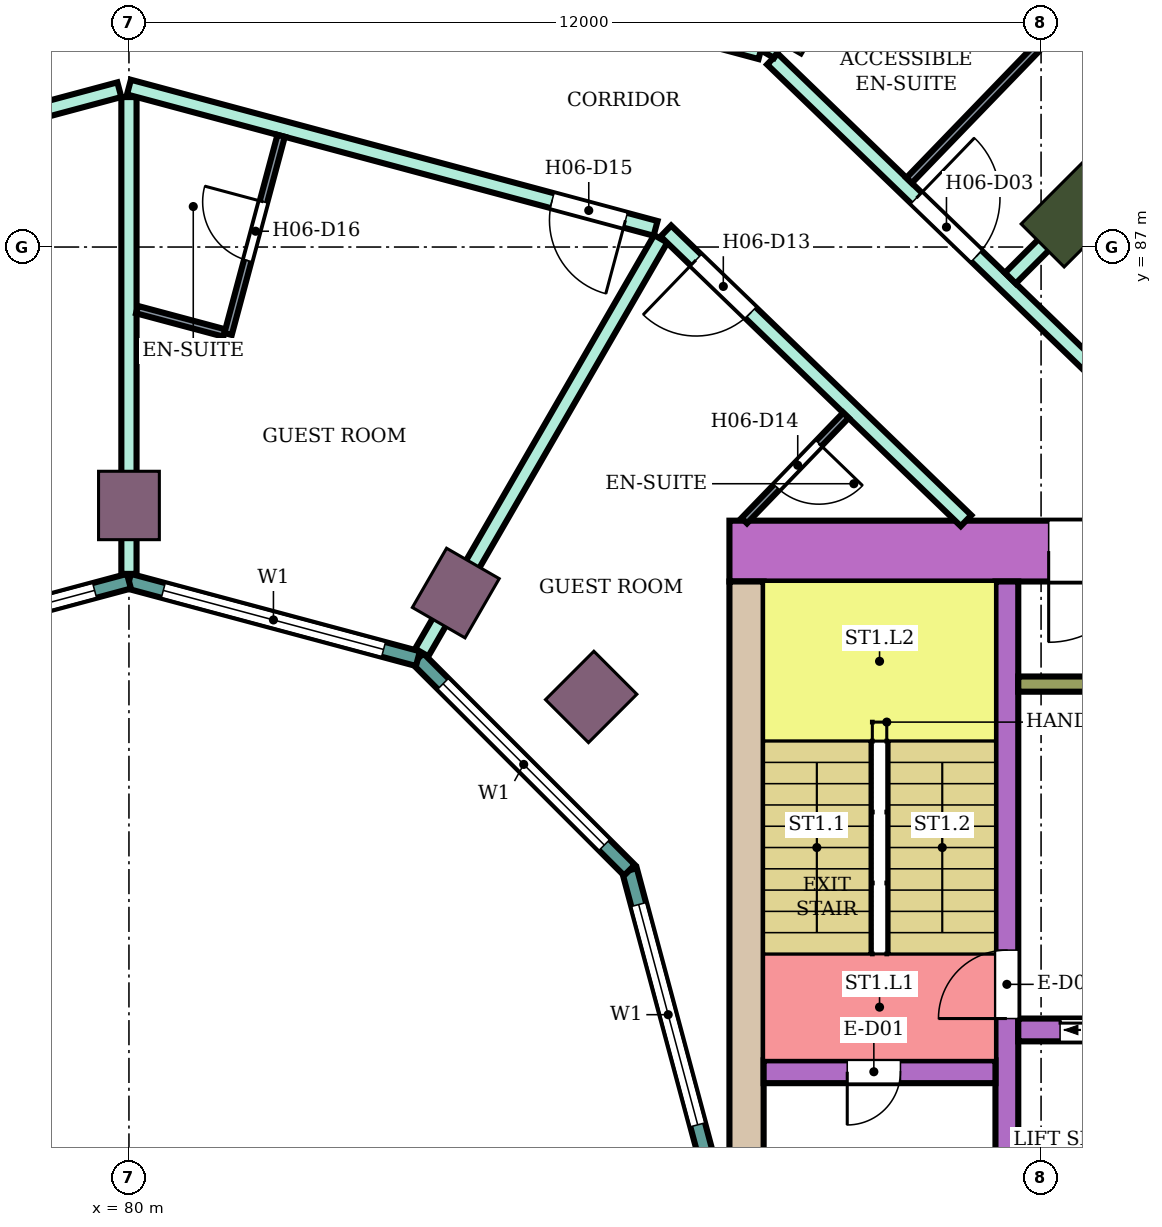
"""IFC4 building model, lengths in metres.
Left out: names, types, materials, properties, quantities, classifications, styles, units other than length and angle.
Written with IfcOpenShell. Run it as: python <this file> out.ifc"""

import sys

from ifc_helpers import new_model, si_unit, direction, frame, frame_2d, origin, origin_2d, place, context, subcontext, project, spatial, rectangle, extrude, element, fill, save


model = new_model("IFC4")
c1 = context("Model", 3, precision=1e-05, world=origin(), true_north=direction((0.0, 1.0)))
c2 = subcontext(c1, "Body", "Model", "MODEL_VIEW")
j1 = project(units=[si_unit("LENGTHUNIT", "METRE"), si_unit("PLANEANGLEUNIT", "RADIAN")], contexts=[c1])
p1 = place(None, origin())
s1 = spatial("IfcSite", under=j1, at=p1, CompositionType="ELEMENT")
p2 = place(p1, origin())
s2 = spatial("IfcBuilding", under=s1, at=p2, CompositionType="ELEMENT")
p3 = place(p2, frame((0.0, 0.0, 101.4)))
s3 = spatial("IfcBuildingStorey", under=s2, at=p3, CompositionType="ELEMENT", Elevation=101.4)
for number, where, z_axis, x_axis in (
    (1, (92.445, 87.445, 0.0), (0.0, 0.0, 1.0), (0.707, 0.707, 0.0)),
    (2, (88.8, 90.242, 0.0), (0.0, 0.0, 1.0), (0.5, 0.866, 0.0)),
):
    element("IfcColumn", number, at=place(p3, frame(where, z_axis=z_axis, x_axis=x_axis)), inside=s3, PredefinedType="COLUMN", context=c2, shape_type="SweptSolid", body=[
        extrude(rectangle(XDim=1.2, YDim=0.8, at=origin_2d()), origin(), (0.0, 0.0, 1.0), 3.8),
    ])
for number, where, z_axis, x_axis in (
    (3, (86.081, 81.081, 0.0), (0.0, 0.0, 1.0), (0.707, 0.707, 0.0)),
    (4, (84.3, 82.448, 0.0), (0.0, 0.0, 1.0), (0.5, 0.866, 0.0)),
    (5, (80.0, 83.6, 0.0), (0.0, 0.0, 1.0), (0.0, 1.0, 0.0)),
):
    element("IfcColumn", number, at=place(p3, frame(where, z_axis=z_axis, x_axis=x_axis)), inside=s3, PredefinedType="COLUMN", context=c2, shape_type="SweptSolid", body=[
        extrude(rectangle(XDim=0.9, YDim=0.8, at=origin_2d()), origin(), (0.0, 0.0, 1.0), 3.8),
    ])
p4 = place(p3, frame((87.9, 83.0, 0.0), z_axis=(0.0, 0.0, 1.0), x_axis=(1.0, 0.0, 0.0)))
e6 = element("IfcWall", 6, at=p4, inside=s3, PredefinedType="SHEAR", context=c2, shape_type="SweptSolid", body=[
    extrude(rectangle(XDim=14.7, YDim=0.8, at=frame_2d((7.35, 0.0))), origin(), (0.0, 0.0, 1.0), 3.48),
])
p5 = place(p4, frame((4.2, 0.0, 0.0)))
e7 = element("IfcOpeningElement", 7, at=p5, cuts=e6, PredefinedType="OPENING", context=c2, shape_type="SweptSolid", body=[
    extrude(rectangle(XDim=2.4, YDim=2.4, at=frame_2d((1.2, 1.2))), frame((0.0, 0.41, 0.0), z_axis=(0.0, -1.0, 0.0), x_axis=(1.0, 0.0, 0.0)), (0.0, 0.0, 1.0), 0.82),
])
p6 = place(p3, frame((88.125, 75.0, 0.0), z_axis=(0.0, 0.0, 1.0), x_axis=(0.0, 1.0, 0.0)))
e8 = element("IfcWall", 8, at=p6, inside=s3, PredefinedType="SHEAR", context=c2, shape_type="SweptSolid", body=[
    extrude(rectangle(XDim=7.6, YDim=0.45, at=frame_2d((3.8, 0.0))), origin(), (0.0, 0.0, 1.0), 3.48),
])
p7 = place(p3, frame((91.55, 75.0, 0.0), z_axis=(0.0, 0.0, 1.0), x_axis=(0.0, 1.0, 0.0)))
e9 = element("IfcWall", 9, at=p7, inside=s3, PredefinedType="SHEAR", context=c2, shape_type="SweptSolid", body=[
    extrude(rectangle(XDim=7.6, YDim=0.3, at=frame_2d((3.8, 0.0))), origin(), (0.0, 0.0, 1.0), 3.48),
])
p8 = place(p7, frame((1.85, 0.0, 0.0)))
e10 = element("IfcOpeningElement", 10, at=p8, cuts=e9, PredefinedType="OPENING", context=c2, shape_type="SweptSolid", body=[
    extrude(rectangle(XDim=0.9, YDim=2.1, at=frame_2d((0.45, 1.05))), frame((0.0, 0.16, 0.0), z_axis=(0.0, -1.0, 0.0), x_axis=(1.0, 0.0, 0.0)), (0.0, 0.0, 1.0), 0.32),
])
p9 = place(p3, frame((88.35, 76.15, 0.0), z_axis=(0.0, 0.0, 1.0), x_axis=(1.0, 0.0, 0.0)))
e11 = element("IfcWall", 11, at=p9, inside=s3, PredefinedType="SHEAR", context=c2, shape_type="SweptSolid", body=[
    extrude(rectangle(XDim=3.05, YDim=0.3, at=frame_2d((1.525, 0.0))), origin(), (0.0, 0.0, 1.0), 3.48),
])
p10 = place(p9, frame((1.1, 0.0, 0.0)))
e12 = element("IfcOpeningElement", 12, at=p10, cuts=e11, PredefinedType="OPENING", context=c2, shape_type="SweptSolid", body=[
    extrude(rectangle(XDim=0.7, YDim=2.0, at=frame_2d((0.35, 1.0))), frame((0.0, 0.16, 0.0), z_axis=(0.0, -1.0, 0.0), x_axis=(1.0, 0.0, 0.0)), (0.0, 0.0, 1.0), 0.32),
])
p11 = place(p3, frame((91.7, 76.7, 0.0), z_axis=(0.0, 0.0, 1.0), x_axis=(1.0, 0.0, 0.0)))
e13 = element("IfcWall", 13, at=p11, inside=s3, PredefinedType="SHEAR", context=c2, shape_type="SweptSolid", body=[
    extrude(rectangle(XDim=10.9, YDim=0.3, at=frame_2d((5.45, 0.0))), origin(), (0.0, 0.0, 1.0), 3.48),
])
p12 = place(p11, frame((0.55, 0.0, 0.0)))
e14 = element("IfcOpeningElement", 14, at=p12, cuts=e13, PredefinedType="OPENING", context=c2, shape_type="SweptSolid", body=[
    extrude(rectangle(XDim=1.1, YDim=2.1, at=frame_2d((0.55, 1.05))), frame((0.0, 0.16, 0.0), z_axis=(0.0, -1.0, 0.0), x_axis=(1.0, 0.0, 0.0)), (0.0, 0.0, 1.0), 0.32),
])
p13 = place(p11, frame((8.1, 0.0, 0.0)))
e15 = element("IfcOpeningElement", 15, at=p13, cuts=e13, PredefinedType="OPENING", context=c2, shape_type="SweptSolid", body=[
    extrude(rectangle(XDim=1.0, YDim=2.1, at=frame_2d((0.5, 1.05))), frame((0.0, 0.16, 0.0), z_axis=(0.0, -1.0, 0.0), x_axis=(1.0, 0.0, 0.0)), (0.0, 0.0, 1.0), 0.32),
])
p14 = place(p3, frame((91.7, 81.25, 0.0), z_axis=(0.0, 0.0, 1.0), x_axis=(1.0, 0.0, 0.0)))
e16 = element("IfcWall", 16, at=p14, inside=s3, PredefinedType="SHEAR", context=c2, shape_type="SweptSolid", body=[
    extrude(rectangle(XDim=4.65, YDim=0.2, at=frame_2d((2.325, 0.0))), origin(), (0.0, 0.0, 1.0), 3.48),
])
p15 = place(p3, frame((87.604, 75.0, 0.0), z_axis=(0.0, 0.0, 1.0), x_axis=(-0.258789828301, 0.965933654434, 0.0)))
e17 = element("IfcWall", 17, at=p15, inside=s3, PredefinedType="NOTDEFINED", context=c2, shape_type="SweptSolid", body=[
    extrude(rectangle(XDim=3.936, YDim=0.2, at=frame_2d((1.968, 0.0))), origin(), (0.0, 0.0, 1.0), 3.8),
])
p16 = place(p15, frame((0.468, 0.0, 0.9)))
e18 = element("IfcOpeningElement", 18, at=p16, cuts=e17, PredefinedType="OPENING", context=c2, shape_type="SweptSolid", body=[
    extrude(rectangle(XDim=3.0, YDim=2.3, at=frame_2d((1.5, 1.15))), frame((0.0, 0.11, 0.0), z_axis=(0.0, -1.0, 0.0), x_axis=(1.0, 0.0, 0.0)), (0.0, 0.0, 1.0), 0.22),
])
p17 = place(p3, frame((86.585, 78.802, 0.0), z_axis=(0.0, 0.0, 1.0), x_axis=(-0.707106781187, 0.707106781187, 0.0)))
e19 = element("IfcWall", 19, at=p17, inside=s3, PredefinedType="NOTDEFINED", context=c2, shape_type="SweptSolid", body=[
    extrude(rectangle(XDim=3.936, YDim=0.2, at=frame_2d((1.968, 0.0))), origin(), (0.0, 0.0, 1.0), 3.8),
])
p18 = place(p17, frame((0.468, 0.0, 0.9)))
e20 = element("IfcOpeningElement", 20, at=p18, cuts=e19, PredefinedType="OPENING", context=c2, shape_type="SweptSolid", body=[
    extrude(rectangle(XDim=3.0, YDim=2.3, at=frame_2d((1.5, 1.15))), frame((0.0, 0.11, 0.0), z_axis=(0.0, -1.0, 0.0), x_axis=(1.0, 0.0, 0.0)), (0.0, 0.0, 1.0), 0.22),
])
p19 = place(p3, frame((83.802, 81.585, 0.0), z_axis=(0.0, 0.0, 1.0), x_axis=(-0.965933654434, 0.258789828301, 0.0)))
e21 = element("IfcWall", 21, at=p19, inside=s3, PredefinedType="NOTDEFINED", context=c2, shape_type="SweptSolid", body=[
    extrude(rectangle(XDim=3.936, YDim=0.2, at=frame_2d((1.968, 0.0))), origin(), (0.0, 0.0, 1.0), 3.8),
])
p20 = place(p19, frame((0.468, 0.0, 0.9)))
e22 = element("IfcOpeningElement", 22, at=p20, cuts=e21, PredefinedType="OPENING", context=c2, shape_type="SweptSolid", body=[
    extrude(rectangle(XDim=3.0, YDim=2.3, at=frame_2d((1.5, 1.15))), frame((0.0, 0.11, 0.0), z_axis=(0.0, -1.0, 0.0), x_axis=(1.0, 0.0, 0.0)), (0.0, 0.0, 1.0), 0.22),
])
p21 = place(p3, frame((80.0, 82.604, 0.0), z_axis=(0.0, 0.0, 1.0), x_axis=(-0.965933654434, -0.258789828301, 0.0)))
e23 = element("IfcWall", 23, at=p21, inside=s3, PredefinedType="NOTDEFINED", context=c2, shape_type="SweptSolid", body=[
    extrude(rectangle(XDim=3.936, YDim=0.2, at=frame_2d((1.968, 0.0))), origin(), (0.0, 0.0, 1.0), 3.8),
])
p22 = place(p21, frame((0.468, 0.0, 0.9)))
e24 = element("IfcOpeningElement", 24, at=p22, cuts=e23, PredefinedType="OPENING", context=c2, shape_type="SweptSolid", body=[
    extrude(rectangle(XDim=3.0, YDim=2.3, at=frame_2d((1.5, 1.15))), frame((0.0, 0.11, 0.0), z_axis=(0.0, -1.0, 0.0), x_axis=(1.0, 0.0, 0.0)), (0.0, 0.0, 1.0), 0.22),
])
p23 = place(p3, frame((71.614, 89.55, 0.0), z_axis=(0.0, 0.0, 1.0), x_axis=(0.965982378603, 0.258607896685, 0.0)))
e25 = element("IfcWall", 25, at=p23, inside=s3, PredefinedType="PARTITIONING", context=c2, shape_type="SweptSolid", body=[
    extrude(rectangle(XDim=8.632, YDim=0.2, at=frame_2d((4.316, 0.0))), origin(), (0.0, 0.0, 1.0), 3.35),
])
p24 = place(p23, frame((2.804, 0.0, 0.0)))
e26 = element("IfcOpeningElement", 26, at=p24, cuts=e25, PredefinedType="OPENING", context=c2, shape_type="SweptSolid", body=[
    extrude(rectangle(XDim=1.0, YDim=2.1, at=frame_2d((0.5, 1.05))), frame((0.0, 0.11, 0.0), z_axis=(0.0, -1.0, 0.0), x_axis=(1.0, 0.0, 0.0)), (0.0, 0.0, 1.0), 0.22),
])
p25 = place(p3, frame((72.936, 87.211, 0.0), z_axis=(0.0, 0.0, 1.0), x_axis=(0.965917703859, 0.258849356521, 0.0)))
e27 = element("IfcWall", 27, at=p25, inside=s3, PredefinedType="PARTITIONING", context=c2, shape_type="SweptSolid", body=[
    extrude(rectangle(XDim=7.182, YDim=0.2, at=frame_2d((3.591, 0.0))), origin(), (0.0, 0.0, 1.0), 3.35),
])
p26 = place(p25, frame((2.757, 0.0, 0.0)))
e28 = element("IfcOpeningElement", 28, at=p26, cuts=e27, PredefinedType="OPENING", context=c2, shape_type="SweptSolid", body=[
    extrude(rectangle(XDim=1.8, YDim=2.1, at=frame_2d((0.9, 1.05))), frame((0.0, 0.11, 0.0), z_axis=(0.0, -1.0, 0.0), x_axis=(1.0, 0.0, 0.0)), (0.0, 0.0, 1.0), 0.22),
])
p27 = place(p3, frame((80.0, 82.7, 0.0), z_axis=(0.0, 0.0, 1.0), x_axis=(0.0, 1.0, 0.0)))
e29 = element("IfcWall", 29, at=p27, inside=s3, PredefinedType="PARTITIONING", context=c2, shape_type="SweptSolid", body=[
    extrude(rectangle(XDim=6.273, YDim=0.2, at=frame_2d((3.136, 0.0))), origin(), (0.0, 0.0, 1.0), 3.35),
])
p28 = place(p3, frame((80.0, 89.104, 0.0), z_axis=(0.0, 0.0, 1.0), x_axis=(0.965856548257, -0.259077455964, 0.0)))
e30 = element("IfcWall", 30, at=p28, inside=s3, PredefinedType="PARTITIONING", context=c2, shape_type="SweptSolid", body=[
    extrude(rectangle(XDim=7.173, YDim=0.2, at=frame_2d((3.586, 0.0))), origin(), (0.0, 0.0, 1.0), 3.35),
])
p29 = place(p28, frame((5.763, 0.0, 0.0)))
e31 = element("IfcOpeningElement", 31, at=p29, cuts=e30, PredefinedType="OPENING", context=c2, shape_type="SweptSolid", body=[
    extrude(rectangle(XDim=1.0, YDim=2.1, at=frame_2d((0.5, 1.05))), frame((0.0, 0.11, 0.0), z_axis=(0.0, -1.0, 0.0), x_axis=(1.0, 0.0, 0.0)), (0.0, 0.0, 1.0), 0.22),
])
p30 = place(p3, frame((80.0, 91.796, 0.0), z_axis=(0.0, 0.0, 1.0), x_axis=(0.965917643923, -0.258849580177, 0.0)))
e32 = element("IfcWall", 32, at=p30, inside=s3, PredefinedType="PARTITIONING", context=c2, shape_type="SweptSolid", body=[
    extrude(rectangle(XDim=8.602, YDim=0.2, at=frame_2d((4.301, 0.0))), origin(), (0.0, 0.0, 1.0), 3.35),
])
p31 = place(p30, frame((2.091, 0.0, 0.0)))
e33 = element("IfcOpeningElement", 33, at=p31, cuts=e32, PredefinedType="OPENING", context=c2, shape_type="SweptSolid", body=[
    extrude(rectangle(XDim=1.8, YDim=2.1, at=frame_2d((0.9, 1.05))), frame((0.0, 0.11, 0.0), z_axis=(0.0, -1.0, 0.0), x_axis=(1.0, 0.0, 0.0)), (0.0, 0.0, 1.0), 0.22),
])
p32 = place(p3, frame((83.852, 81.665, 0.0), z_axis=(0.0, 0.0, 1.0), x_axis=(0.500236829077, 0.86588862727, 0.0)))
e34 = element("IfcWall", 34, at=p32, inside=s3, PredefinedType="PARTITIONING", context=c2, shape_type="SweptSolid", body=[
    extrude(rectangle(XDim=6.286, YDim=0.2, at=frame_2d((3.143, 0.0))), origin(), (0.0, 0.0, 1.0), 3.35),
])
p33 = place(p3, frame((87.064, 87.211, 0.0), z_axis=(0.0, 0.0, 1.0), x_axis=(0.719540958932, -0.694450004262, 0.0)))
e35 = element("IfcWall", 35, at=p33, inside=s3, PredefinedType="PARTITIONING", context=c2, shape_type="SweptSolid", body=[
    extrude(rectangle(XDim=5.488, YDim=0.2, at=frame_2d((2.744, 0.0))), origin(), (0.0, 0.0, 1.0), 3.35),
])
p34 = place(p33, frame((0.55, 0.0, 0.0)))
e36 = element("IfcOpeningElement", 36, at=p34, cuts=e35, PredefinedType="OPENING", context=c2, shape_type="SweptSolid", body=[
    extrude(rectangle(XDim=1.0, YDim=2.1, at=frame_2d((0.5, 1.05))), frame((0.0, 0.11, 0.0), z_axis=(0.0, -1.0, 0.0), x_axis=(1.0, 0.0, 0.0)), (0.0, 0.0, 1.0), 0.22),
])
p35 = place(p3, frame((88.465, 89.473, 0.0), z_axis=(0.0, 0.0, 1.0), x_axis=(0.719474304909, -0.694519059908, 0.0)))
e37 = element("IfcWall", 37, at=p35, inside=s3, PredefinedType="PARTITIONING", context=c2, shape_type="SweptSolid", body=[
    extrude(rectangle(XDim=6.525, YDim=0.2, at=frame_2d((3.263, 0.0))), origin(), (0.0, 0.0, 1.0), 3.35),
])
p36 = place(p35, frame((2.633, 0.0, 0.0)))
e38 = element("IfcOpeningElement", 38, at=p36, cuts=e37, PredefinedType="OPENING", context=c2, shape_type="SweptSolid", body=[
    extrude(rectangle(XDim=1.1, YDim=2.1, at=frame_2d((0.55, 1.05))), frame((0.0, 0.11, 0.0), z_axis=(0.0, -1.0, 0.0), x_axis=(1.0, 0.0, 0.0)), (0.0, 0.0, 1.0), 0.22),
])
p37 = place(p3, frame((88.4, 89.538, 0.0), z_axis=(0.0, 0.0, 1.0), x_axis=(0.500234695877, 0.865889859648, 0.0)))
e39 = element("IfcWall", 39, at=p37, inside=s3, PredefinedType="PARTITIONING", context=c2, shape_type="SweptSolid", body=[
    extrude(rectangle(XDim=9.007, YDim=0.2, at=frame_2d((4.503, 0.0))), origin(), (0.0, 0.0, 1.0), 3.35),
])
p38 = place(p3, frame((91.595, 86.59, 0.0), z_axis=(0.0, 0.0, 1.0), x_axis=(0.707232337591, 0.706981202484, 0.0)))
e40 = element("IfcWall", 40, at=p38, inside=s3, PredefinedType="PARTITIONING", context=c2, shape_type="SweptSolid", body=[
    extrude(rectangle(XDim=6.805, YDim=0.2, at=frame_2d((3.402, 0.0))), origin(), (0.0, 0.0, 1.0), 3.35),
])
p39 = place(p3, frame((80.106, 86.177, 0.0), z_axis=(0.0, 0.0, 1.0), x_axis=(0.966002973184, -0.258530957139, 0.0)))
e41 = element("IfcWall", 41, at=p39, inside=s3, PredefinedType="PARTITIONING", context=c2, shape_type="SweptSolid", body=[
    extrude(rectangle(XDim=1.19, YDim=0.1, at=frame_2d((0.595, 0.0))), origin(), (0.0, 0.0, 1.0), 3.35),
])
p40 = place(p3, frame((81.304, 85.856, 0.0), z_axis=(0.0, 0.0, 1.0), x_axis=(0.25867580527, 0.965964195904, 0.0)))
e42 = element("IfcWall", 42, at=p40, inside=s3, PredefinedType="PARTITIONING", context=c2, shape_type="SweptSolid", body=[
    extrude(rectangle(XDim=2.699, YDim=0.1, at=frame_2d((1.35, 0.0))), origin(), (0.0, 0.0, 1.0), 3.35),
])
p41 = place(p40, frame((1.0, 0.0, 0.0)))
e43 = element("IfcOpeningElement", 43, at=p41, cuts=e42, PredefinedType="OPENING", context=c2, shape_type="SweptSolid", body=[
    extrude(rectangle(XDim=0.8, YDim=2.1, at=frame_2d((0.4, 1.05))), frame((0.0, 0.06, 0.0), z_axis=(0.0, -1.0, 0.0), x_axis=(1.0, 0.0, 0.0)), (0.0, 0.0, 1.0), 0.12),
])
p42 = place(p3, frame((88.095, 83.4, 0.0), z_axis=(0.0, 0.0, 1.0), x_axis=(0.694447472534, 0.719543402368, 0.0)))
e44 = element("IfcWall", 44, at=p42, inside=s3, PredefinedType="PARTITIONING", context=c2, shape_type="SweptSolid", body=[
    extrude(rectangle(XDim=1.926, YDim=0.1, at=frame_2d((0.963, 0.0))), origin(), (0.0, 0.0, 1.0), 3.35),
])
p43 = place(p42, frame((0.613, 0.0, 0.0)))
e45 = element("IfcOpeningElement", 45, at=p43, cuts=e44, PredefinedType="OPENING", context=c2, shape_type="SweptSolid", body=[
    extrude(rectangle(XDim=0.8, YDim=2.1, at=frame_2d((0.4, 1.05))), frame((0.0, 0.06, 0.0), z_axis=(0.0, -1.0, 0.0), x_axis=(1.0, 0.0, 0.0)), (0.0, 0.0, 1.0), 0.12),
])
p44 = place(p3, frame((90.263, 87.876, 0.0), z_axis=(0.0, 0.0, 1.0), x_axis=(0.694534400859, 0.719459495749, 0.0)))
e46 = element("IfcWall", 46, at=p44, inside=s3, PredefinedType="PARTITIONING", context=c2, shape_type="SweptSolid", body=[
    extrude(rectangle(XDim=2.899, YDim=0.1, at=frame_2d((1.45, 0.0))), origin(), (0.0, 0.0, 1.0), 3.35),
])
p45 = place(p16, origin())
e47 = element("IfcWindow", 47, at=p45, inside=s3, PartitioningType="SINGLE_PANEL", PredefinedType="WINDOW", context=c2, shape_type="SweptSolid", body=[
    extrude(rectangle(XDim=3.0, YDim=2.3, at=frame_2d((1.5, 1.15))), frame((0.0, 0.03, 0.0), z_axis=(0.0, -1.0, 0.0), x_axis=(1.0, 0.0, 0.0)), (0.0, 0.0, 1.0), 0.06),
])
fill(e18, e47)
p46 = place(p18, origin())
e48 = element("IfcWindow", 48, at=p46, inside=s3, PartitioningType="SINGLE_PANEL", PredefinedType="WINDOW", context=c2, shape_type="SweptSolid", body=[
    extrude(rectangle(XDim=3.0, YDim=2.3, at=frame_2d((1.5, 1.15))), frame((0.0, 0.03, 0.0), z_axis=(0.0, -1.0, 0.0), x_axis=(1.0, 0.0, 0.0)), (0.0, 0.0, 1.0), 0.06),
])
fill(e20, e48)
p47 = place(p20, origin())
e49 = element("IfcWindow", 49, at=p47, inside=s3, PartitioningType="SINGLE_PANEL", PredefinedType="WINDOW", context=c2, shape_type="SweptSolid", body=[
    extrude(rectangle(XDim=3.0, YDim=2.3, at=frame_2d((1.5, 1.15))), frame((0.0, 0.03, 0.0), z_axis=(0.0, -1.0, 0.0), x_axis=(1.0, 0.0, 0.0)), (0.0, 0.0, 1.0), 0.06),
])
fill(e22, e49)
p48 = place(p22, origin())
e50 = element("IfcWindow", 50, at=p48, inside=s3, PartitioningType="SINGLE_PANEL", PredefinedType="WINDOW", context=c2, shape_type="SweptSolid", body=[
    extrude(rectangle(XDim=3.0, YDim=2.3, at=frame_2d((1.5, 1.15))), frame((0.0, 0.03, 0.0), z_axis=(0.0, -1.0, 0.0), x_axis=(1.0, 0.0, 0.0)), (0.0, 0.0, 1.0), 0.06),
])
fill(e24, e50)
p49 = place(p36, origin())
e51 = element("IfcDoor", 51, at=p49, inside=s3, OperationType="SINGLE_SWING_LEFT", PredefinedType="DOOR", context=c2, shape_type="SweptSolid", body=[
    extrude(rectangle(XDim=1.1, YDim=2.1, at=frame_2d((0.55, 1.05))), frame((0.0, 0.025, 0.0), z_axis=(0.0, -1.0, 0.0), x_axis=(1.0, 0.0, 0.0)), (0.0, 0.0, 1.0), 0.05),
])
fill(e38, e51)
p50 = place(p34, frame((1.0, 0.0, 0.0), z_axis=(0.0, 0.0, 1.0), x_axis=(-1.0, 0.0, 0.0)))
e52 = element("IfcDoor", 52, at=p50, inside=s3, OperationType="SINGLE_SWING_RIGHT", PredefinedType="DOOR", context=c2, shape_type="SweptSolid", body=[
    extrude(rectangle(XDim=1.0, YDim=2.1, at=frame_2d((0.5, 1.05))), frame((0.0, 0.025, 0.0), z_axis=(0.0, -1.0, 0.0), x_axis=(1.0, 0.0, 0.0)), (0.0, 0.0, 1.0), 0.05),
])
fill(e36, e52)
p51 = place(p43, frame((0.8, 0.0, 0.0), z_axis=(0.0, 0.0, 1.0), x_axis=(-1.0, 0.0, 0.0)))
e53 = element("IfcDoor", 53, at=p51, inside=s3, OperationType="SINGLE_SWING_LEFT", PredefinedType="DOOR", context=c2, shape_type="SweptSolid", body=[
    extrude(rectangle(XDim=0.8, YDim=2.1, at=frame_2d((0.4, 1.05))), frame((0.0, 0.025, 0.0), z_axis=(0.0, -1.0, 0.0), x_axis=(1.0, 0.0, 0.0)), (0.0, 0.0, 1.0), 0.05),
])
fill(e45, e53)
p52 = place(p29, frame((1.0, 0.0, 0.0), z_axis=(0.0, 0.0, 1.0), x_axis=(-1.0, 0.0, 0.0)))
e54 = element("IfcDoor", 54, at=p52, inside=s3, OperationType="SINGLE_SWING_LEFT", PredefinedType="DOOR", context=c2, shape_type="SweptSolid", body=[
    extrude(rectangle(XDim=1.0, YDim=2.1, at=frame_2d((0.5, 1.05))), frame((0.0, 0.025, 0.0), z_axis=(0.0, -1.0, 0.0), x_axis=(1.0, 0.0, 0.0)), (0.0, 0.0, 1.0), 0.05),
])
fill(e31, e54)
p53 = place(p41, origin())
e55 = element("IfcDoor", 55, at=p53, inside=s3, OperationType="SINGLE_SWING_RIGHT", PredefinedType="DOOR", context=c2, shape_type="SweptSolid", body=[
    extrude(rectangle(XDim=0.8, YDim=2.1, at=frame_2d((0.4, 1.05))), frame((0.0, 0.025, 0.0), z_axis=(0.0, -1.0, 0.0), x_axis=(1.0, 0.0, 0.0)), (0.0, 0.0, 1.0), 0.05),
])
fill(e43, e55)
p54 = place(p10, frame((0.7, 0.0, 0.0), z_axis=(0.0, 0.0, 1.0), x_axis=(-1.0, 0.0, 0.0)))
e56 = element("IfcDoor", 56, at=p54, inside=s3, OperationType="SINGLE_SWING_RIGHT", PredefinedType="DOOR", context=c2, shape_type="SweptSolid", body=[
    extrude(rectangle(XDim=0.7, YDim=2.0, at=frame_2d((0.35, 1.0))), frame((0.0, 0.025, 0.0), z_axis=(0.0, -1.0, 0.0), x_axis=(1.0, 0.0, 0.0)), (0.0, 0.0, 1.0), 0.05),
])
fill(e12, e56)
p55 = place(p8, origin())
e57 = element("IfcDoor", 57, at=p55, inside=s3, OperationType="SINGLE_SWING_LEFT", PredefinedType="DOOR", context=c2, shape_type="SweptSolid", body=[
    extrude(rectangle(XDim=0.9, YDim=2.1, at=frame_2d((0.45, 1.05))), frame((0.0, 0.025, 0.0), z_axis=(0.0, -1.0, 0.0), x_axis=(1.0, 0.0, 0.0)), (0.0, 0.0, 1.0), 0.05),
])
fill(e10, e57)
p56 = place(p12, origin())
e58 = element("IfcDoor", 58, at=p56, inside=s3, OperationType="DOUBLE_DOOR_SLIDING", PredefinedType="DOOR", context=c2, shape_type="SweptSolid", body=[
    extrude(rectangle(XDim=1.1, YDim=2.1, at=frame_2d((0.55, 1.05))), frame((0.0, 0.025, 0.0), z_axis=(0.0, -1.0, 0.0), x_axis=(1.0, 0.0, 0.0)), (0.0, 0.0, 1.0), 0.05),
])
fill(e14, e58)
p57 = place(p5, frame((2.4, 0.0, 0.0), z_axis=(0.0, 0.0, 1.0), x_axis=(-1.0, 0.0, 0.0)))
e59 = element("IfcDoor", 59, at=p57, inside=s3, OperationType="DOUBLE_DOOR_SINGLE_SWING", PredefinedType="DOOR", context=c2, shape_type="SweptSolid", body=[
    extrude(rectangle(XDim=2.4, YDim=2.4, at=frame_2d((1.2, 1.2))), frame((0.0, 0.025, 0.0), z_axis=(0.0, -1.0, 0.0), x_axis=(1.0, 0.0, 0.0)), (0.0, 0.0, 1.0), 0.05),
])
fill(e7, e59)
save(model, sys.argv[1])
